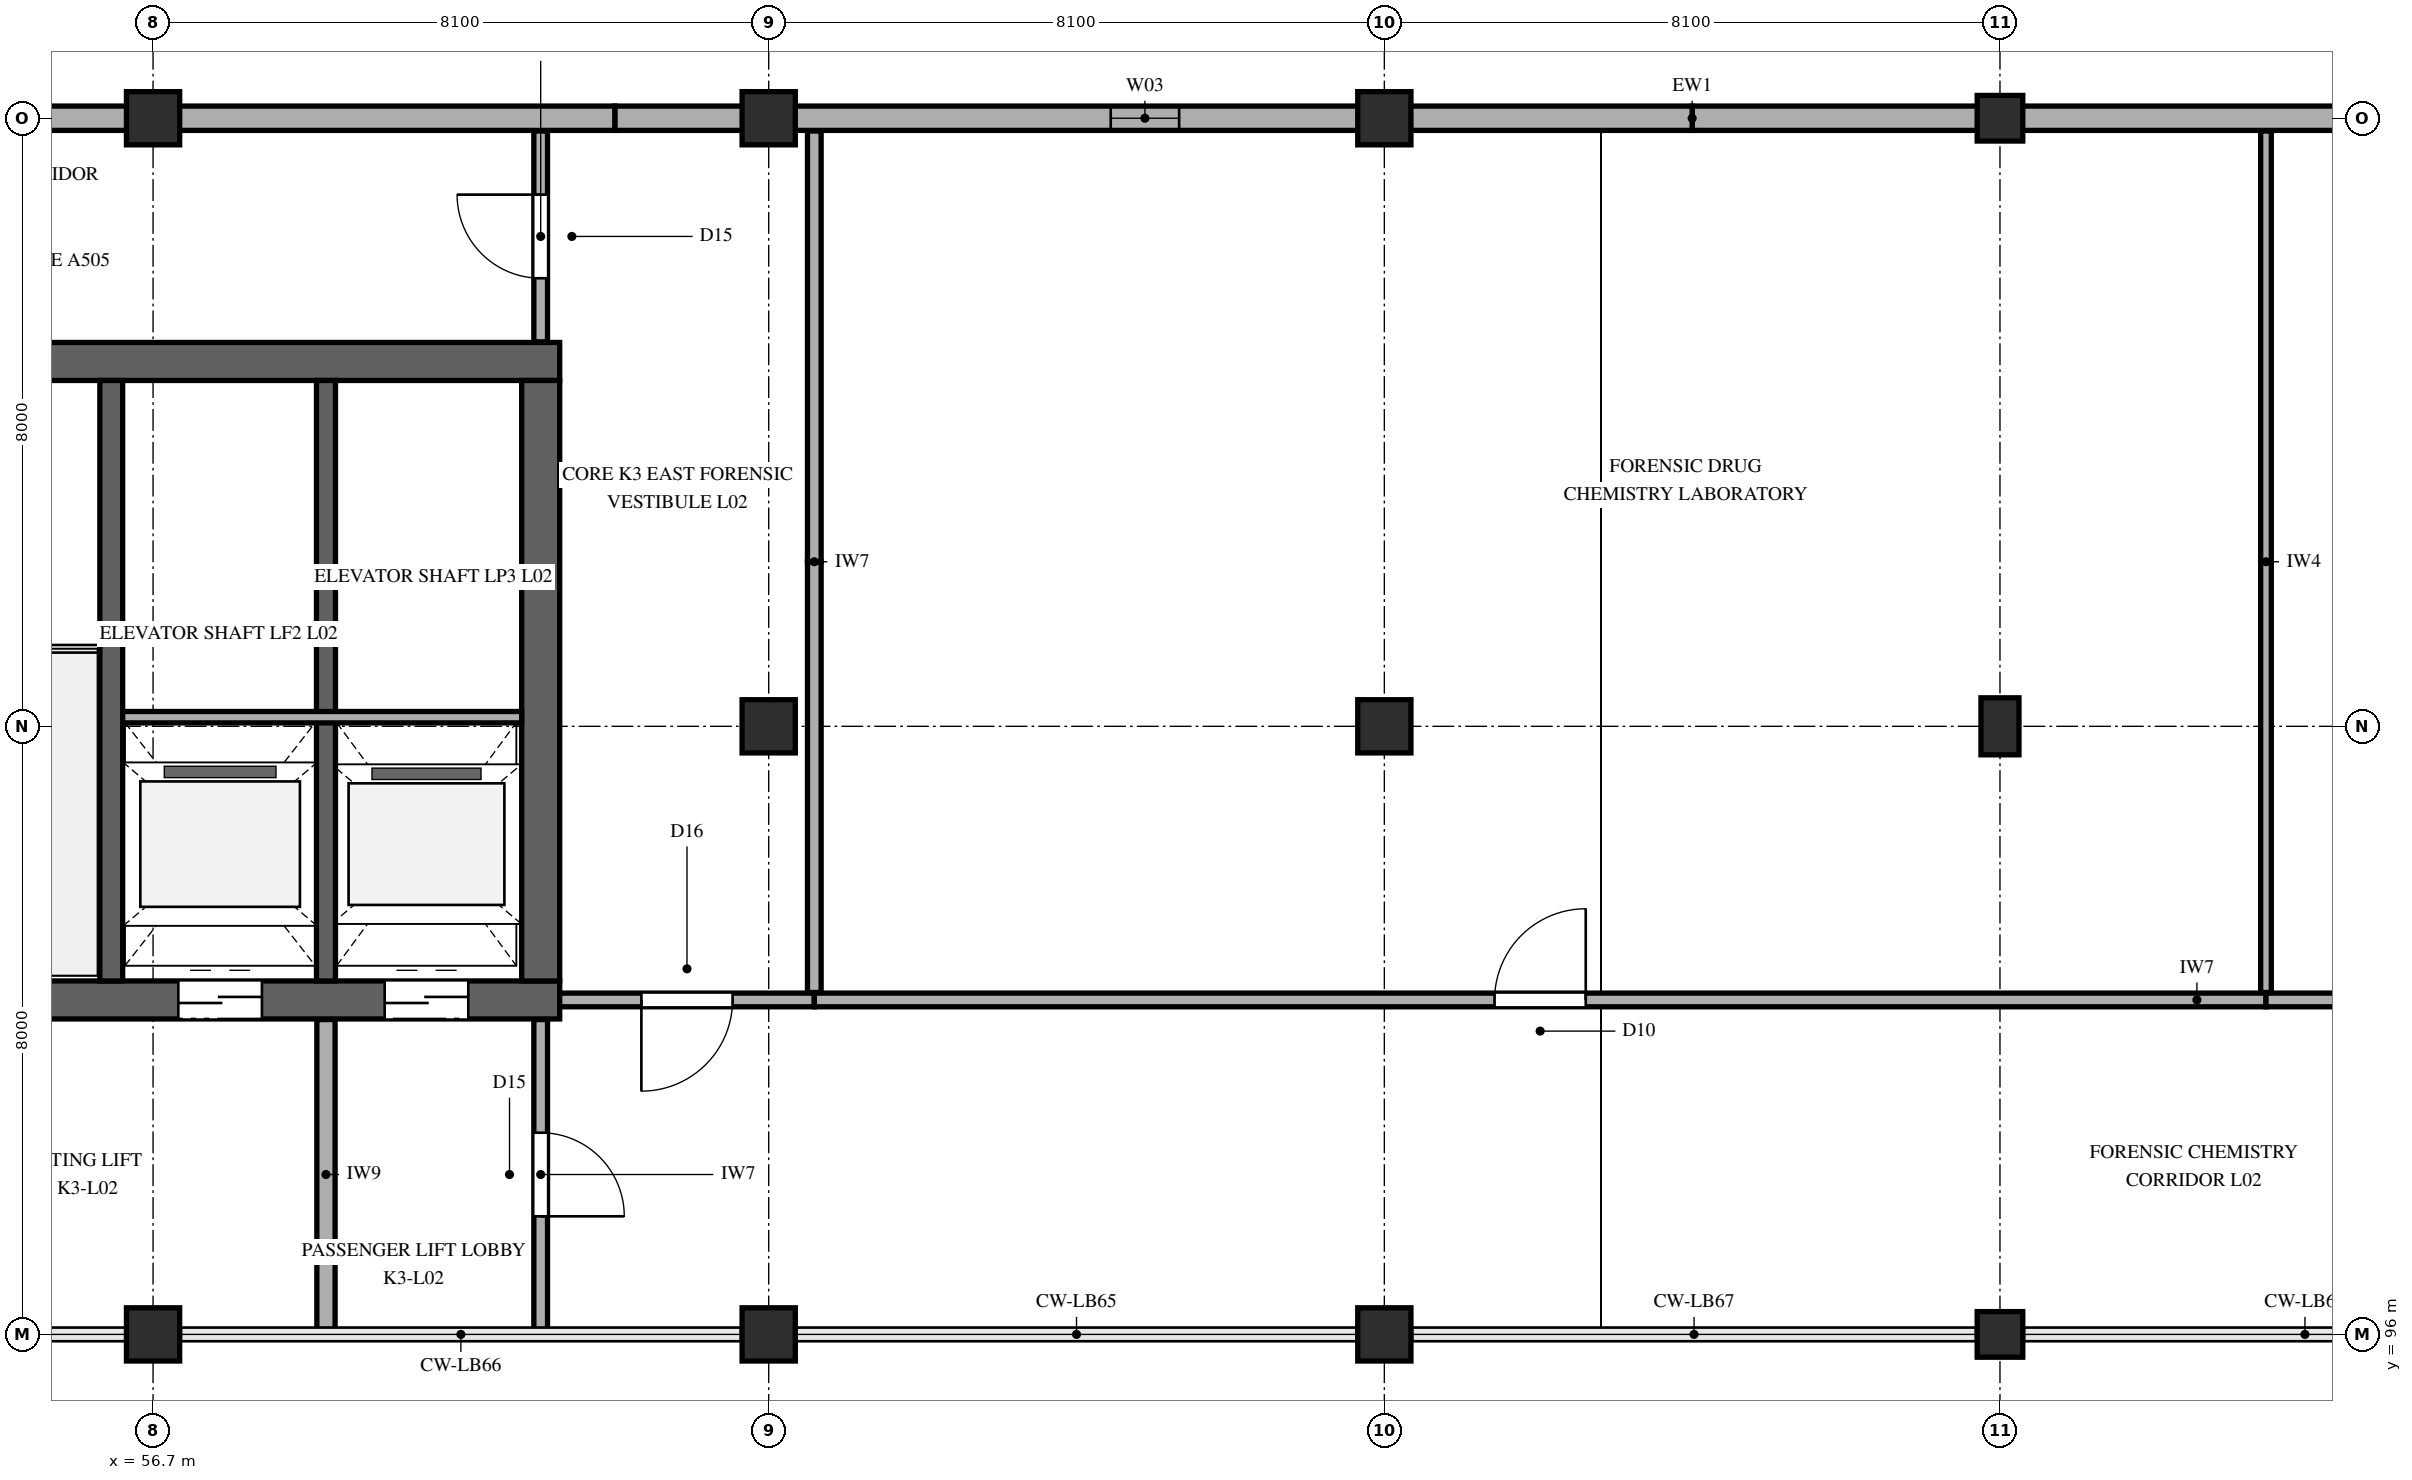
"""IFC4 building model, lengths in metres.
Left out: names, types, materials, properties, quantities, classifications, styles, units other than length and angle.
Written with IfcOpenShell. Run it as: python <this file> out.ifc"""

import sys

from ifc_helpers import new_model, si_unit, direction, frame, frame_2d, origin, origin_2d, place, context, subcontext, project, spatial, rectangle, extrude, element, fill, save


model = new_model("IFC4")
c1 = context("Model", 3, precision=1e-05, world=origin(), true_north=direction((0.0, 1.0)))
c2 = subcontext(c1, "Body", "Model", "MODEL_VIEW")
j1 = project(units=[si_unit("LENGTHUNIT", "METRE"), si_unit("PLANEANGLEUNIT", "RADIAN")], contexts=[c1])
p1 = place(None, origin())
s1 = spatial("IfcSite", under=j1, at=p1, CompositionType="ELEMENT")
p2 = place(p1, origin())
s2 = spatial("IfcBuilding", under=s1, at=p2, CompositionType="ELEMENT")
p3 = place(p2, frame((0.0, 0.0, 10.2)))
s3 = spatial("IfcBuildingStorey", under=s2, at=p3, CompositionType="ELEMENT", Elevation=10.2)
p4 = place(p3, frame((46.75, 100.4, 0.0), z_axis=(0.0, 0.0, 1.0), x_axis=(1.0, 0.0, 0.0)))
e1 = element("IfcWall", 1, at=p4, inside=s3, PredefinedType="SHEAR", context=c2, shape_type="SweptSolid", body=[
    extrude(rectangle(XDim=15.3, YDim=0.5, at=frame_2d((7.65, 0.0))), origin(), (0.0, 0.0, 1.0), 4.5),
])
p5 = place(p4, frame((1.0, 0.0, 0.0)))
e2 = element("IfcOpeningElement", 2, at=p5, cuts=e1, PredefinedType="OPENING", context=c2, shape_type="SweptSolid", body=[
    extrude(rectangle(XDim=1.15, YDim=2.25, at=frame_2d((0.575, 1.125))), frame((0.0, 0.26, 0.0), z_axis=(0.0, -1.0, 0.0), x_axis=(1.0, 0.0, 0.0)), (0.0, 0.0, 1.0), 0.52),
])
p6 = place(p4, frame((10.282, 0.0, 0.0)))
e3 = element("IfcOpeningElement", 3, at=p6, cuts=e1, PredefinedType="OPENING", context=c2, shape_type="SweptSolid", body=[
    extrude(rectangle(XDim=1.1, YDim=2.2, at=frame_2d((0.55, 1.1))), frame((0.0, 0.26, 0.0), z_axis=(0.0, -1.0, 0.0), x_axis=(1.0, 0.0, 0.0)), (0.0, 0.0, 1.0), 0.52),
])
p7 = place(p4, frame((12.998, 0.0, 0.0)))
e4 = element("IfcOpeningElement", 4, at=p7, cuts=e1, PredefinedType="OPENING", context=c2, shape_type="SweptSolid", body=[
    extrude(rectangle(XDim=1.1, YDim=2.2, at=frame_2d((0.55, 1.1))), frame((0.0, 0.26, 0.0), z_axis=(0.0, -1.0, 0.0), x_axis=(1.0, 0.0, 0.0)), (0.0, 0.0, 1.0), 0.52),
])
p8 = place(p3, frame((46.75, 108.8, 0.0), z_axis=(0.0, 0.0, 1.0), x_axis=(1.0, 0.0, 0.0)))
e5 = element("IfcWall", 5, at=p8, inside=s3, PredefinedType="SHEAR", context=c2, shape_type="SweptSolid", body=[
    extrude(rectangle(XDim=15.3, YDim=0.5, at=frame_2d((7.65, 0.0))), origin(), (0.0, 0.0, 1.0), 4.5),
])
p9 = place(p3, frame((61.8, 100.65, 0.0), z_axis=(0.0, 0.0, 1.0), x_axis=(0.0, 1.0, 0.0)))
e6 = element("IfcWall", 6, at=p9, inside=s3, PredefinedType="SHEAR", context=c2, shape_type="SweptSolid", body=[
    extrude(rectangle(XDim=7.9, YDim=0.5, at=frame_2d((3.95, 0.0))), origin(), (0.0, 0.0, 1.0), 4.5),
])
p10 = place(p3, frame((56.15, 100.65, 0.0), z_axis=(0.0, 0.0, 1.0), x_axis=(0.0, 1.0, 0.0)))
e7 = element("IfcWall", 7, at=p10, inside=s3, PredefinedType="SHEAR", context=c2, shape_type="SweptSolid", body=[
    extrude(rectangle(XDim=7.9, YDim=0.3, at=frame_2d((3.95, 0.0))), origin(), (0.0, 0.0, 1.0), 4.5),
])
p11 = place(p3, frame((58.975, 100.65, 0.0), z_axis=(0.0, 0.0, 1.0), x_axis=(0.0, 1.0, 0.0)))
e8 = element("IfcWall", 8, at=p11, inside=s3, PredefinedType="SHEAR", context=c2, shape_type="SweptSolid", body=[
    extrude(rectangle(XDim=7.9, YDim=0.25, at=frame_2d((3.95, 0.0))), origin(), (0.0, 0.0, 1.0), 4.5),
])
for number, where, z_axis, x_axis in (
    (9, (56.7, 96.0, 0.0), (0.0, 0.0, 1.0), (1.0, 0.0, 0.0)),
    (10, (56.7, 112.0, 0.0), (0.0, 0.0, 1.0), (1.0, 0.0, 0.0)),
    (11, (64.8, 96.0, 0.0), (0.0, 0.0, 1.0), (1.0, 0.0, 0.0)),
    (12, (64.8, 104.0, 0.0), (0.0, 0.0, 1.0), (1.0, 0.0, 0.0)),
    (13, (64.8, 112.0, 0.0), (0.0, 0.0, 1.0), (1.0, 0.0, 0.0)),
    (14, (72.9, 96.0, 0.0), (0.0, 0.0, 1.0), (1.0, 0.0, 0.0)),
    (15, (72.9, 104.0, 0.0), (0.0, 0.0, 1.0), (1.0, 0.0, 0.0)),
    (16, (72.9, 112.0, 0.0), (0.0, 0.0, 1.0), (1.0, 0.0, 0.0)),
):
    element("IfcColumn", number, at=place(p3, frame(where, z_axis=z_axis, x_axis=x_axis)), inside=s3, PredefinedType="COLUMN", context=c2, shape_type="SweptSolid", body=[
        extrude(rectangle(XDim=0.7, YDim=0.7, at=origin_2d()), origin(), (0.0, 0.0, 1.0), 4.5),
    ])
p12 = place(p3, frame((81.0, 96.0, 0.0), z_axis=(0.0, 0.0, 1.0), x_axis=(1.0, 0.0, 0.0)))
e17 = element("IfcColumn", 17, at=p12, inside=s3, PredefinedType="COLUMN", context=c2, shape_type="SweptSolid", body=[
    extrude(rectangle(XDim=0.6, YDim=0.6, at=origin_2d()), origin(), (0.0, 0.0, 1.0), 4.5),
])
p13 = place(p3, frame((81.0, 104.0, 0.0), z_axis=(0.0, 0.0, 1.0), x_axis=(1.0, 0.0, 0.0)))
e18 = element("IfcColumn", 18, at=p13, inside=s3, PredefinedType="COLUMN", context=c2, shape_type="SweptSolid", body=[
    extrude(rectangle(XDim=0.5, YDim=0.75, at=origin_2d()), origin(), (0.0, 0.0, 1.0), 4.5),
])
p14 = place(p3, frame((81.0, 112.0, 0.0), z_axis=(0.0, 0.0, 1.0), x_axis=(1.0, 0.0, 0.0)))
e19 = element("IfcColumn", 19, at=p14, inside=s3, PredefinedType="COLUMN", context=c2, shape_type="SweptSolid", body=[
    extrude(rectangle(XDim=0.6, YDim=0.6, at=origin_2d()), origin(), (0.0, 0.0, 1.0), 4.5),
])
p15 = place(p3, frame((91.125, 112.0, 0.0), z_axis=(0.0, 0.0, 1.0), x_axis=(-1.0, 0.0, 0.0)))
e20 = element("IfcWall", 20, at=p15, inside=s3, PredefinedType="SOLIDWALL", context=c2, shape_type="SweptSolid", body=[
    extrude(rectangle(XDim=14.175, YDim=0.32, at=frame_2d((7.087, 0.0))), origin(), (0.0, 0.0, 1.0), 3.632),
])
p16 = place(p15, frame((4.5, 0.0, 0.85)))
e21 = element("IfcOpeningElement", 21, at=p16, cuts=e20, PredefinedType="OPENING", context=c2, shape_type="SweptSolid", body=[
    extrude(rectangle(XDim=0.9, YDim=2.1, at=frame_2d((0.45, 1.05))), frame((0.0, 0.17, 0.0), z_axis=(0.0, -1.0, 0.0), x_axis=(1.0, 0.0, 0.0)), (0.0, 0.0, 1.0), 0.34),
])
p17 = place(p3, frame((76.95, 112.0, 0.0), z_axis=(0.0, 0.0, 1.0), x_axis=(-1.0, 0.0, 0.0)))
e22 = element("IfcWall", 22, at=p17, inside=s3, PredefinedType="SOLIDWALL", context=c2, shape_type="SweptSolid", body=[
    extrude(rectangle(XDim=14.175, YDim=0.32, at=frame_2d((7.087, 0.0))), origin(), (0.0, 0.0, 1.0), 3.632),
])
p18 = place(p17, frame((6.75, 0.0, 0.85)))
e23 = element("IfcOpeningElement", 23, at=p18, cuts=e22, PredefinedType="OPENING", context=c2, shape_type="SweptSolid", body=[
    extrude(rectangle(XDim=0.9, YDim=2.4, at=frame_2d((0.45, 1.2))), frame((0.0, 0.17, 0.0), z_axis=(0.0, -1.0, 0.0), x_axis=(1.0, 0.0, 0.0)), (0.0, 0.0, 1.0), 0.34),
])
p19 = place(p3, frame((62.775, 112.0, 0.0), z_axis=(0.0, 0.0, 1.0), x_axis=(-1.0, 0.0, 0.0)))
e24 = element("IfcWall", 24, at=p19, inside=s3, PredefinedType="SOLIDWALL", context=c2, shape_type="SweptSolid", body=[
    extrude(rectangle(XDim=14.175, YDim=0.32, at=frame_2d((7.087, 0.0))), origin(), (0.0, 0.0, 1.0), 3.632),
])
p20 = place(p19, frame((8.55, 0.0, 0.95)))
e25 = element("IfcOpeningElement", 25, at=p20, cuts=e24, PredefinedType="OPENING", context=c2, shape_type="SweptSolid", body=[
    extrude(rectangle(XDim=1.2, YDim=1.8, at=frame_2d((0.6, 0.9))), frame((0.0, 0.17, 0.0), z_axis=(0.0, -1.0, 0.0), x_axis=(1.0, 0.0, 0.0)), (0.0, 0.0, 1.0), 0.34),
])
p21 = place(p3, frame((56.3, 104.12, 0.0), z_axis=(0.0, 0.0, 1.0), x_axis=(1.0, 0.0, 0.0)))
e26 = element("IfcWall", 26, at=p21, inside=s3, PredefinedType="PARTITIONING", context=c2, shape_type="SweptSolid", body=[
    extrude(rectangle(XDim=5.25, YDim=0.15, at=frame_2d((2.625, 0.0))), origin(), (0.0, 0.0, 1.0), 4.24),
])
p22 = place(p3, frame((62.05, 100.4, 0.0), z_axis=(0.0, 0.0, 1.0), x_axis=(1.0, 0.0, 0.0)))
e27 = element("IfcWall", 27, at=p22, inside=s3, PredefinedType="PARTITIONING", context=c2, shape_type="SweptSolid", body=[
    extrude(rectangle(XDim=3.35, YDim=0.18, at=frame_2d((1.675, 0.0))), origin(), (0.0, 0.0, 1.0), 4.24),
])
p23 = place(p22, frame((1.075, 0.0, 0.0)))
e28 = element("IfcOpeningElement", 28, at=p23, cuts=e27, PredefinedType="OPENING", context=c2, shape_type="SweptSolid", body=[
    extrude(rectangle(XDim=1.2, YDim=2.2, at=frame_2d((0.6, 1.1))), frame((0.0, 0.1, 0.0), z_axis=(0.0, -1.0, 0.0), x_axis=(1.0, 0.0, 0.0)), (0.0, 0.0, 1.0), 0.2),
])
p24 = place(p3, frame((65.4, 100.4, 0.0), z_axis=(0.0, 0.0, 1.0), x_axis=(1.0, 0.0, 0.0)))
e29 = element("IfcWall", 29, at=p24, inside=s3, PredefinedType="PARTITIONING", context=c2, shape_type="SweptSolid", body=[
    extrude(rectangle(XDim=19.1, YDim=0.18, at=frame_2d((9.55, 0.0))), origin(), (0.0, 0.0, 1.0), 4.24),
])
p25 = place(p24, frame((8.95, 0.0, 0.0)))
e30 = element("IfcOpeningElement", 30, at=p25, cuts=e29, PredefinedType="OPENING", context=c2, shape_type="SweptSolid", body=[
    extrude(rectangle(XDim=1.2, YDim=2.3, at=frame_2d((0.6, 1.15))), frame((0.0, 0.1, 0.0), z_axis=(0.0, -1.0, 0.0), x_axis=(1.0, 0.0, 0.0)), (0.0, 0.0, 1.0), 0.2),
])
p26 = place(p3, frame((84.5, 100.4, 0.0), z_axis=(0.0, 0.0, 1.0), x_axis=(1.0, 0.0, 0.0)))
e31 = element("IfcWall", 31, at=p26, inside=s3, PredefinedType="PARTITIONING", context=c2, shape_type="SweptSolid", body=[
    extrude(rectangle(XDim=20.632, YDim=0.18, at=frame_2d((10.316, 0.0))), origin(), (0.0, 0.0, 1.0), 4.24),
])
p27 = place(p26, frame((9.716, 0.0, 0.0)))
e32 = element("IfcOpeningElement", 32, at=p27, cuts=e31, PredefinedType="OPENING", context=c2, shape_type="SweptSolid", body=[
    extrude(rectangle(XDim=1.2, YDim=2.3, at=frame_2d((0.6, 1.15))), frame((0.0, 0.1, 0.0), z_axis=(0.0, -1.0, 0.0), x_axis=(1.0, 0.0, 0.0)), (0.0, 0.0, 1.0), 0.2),
])
p28 = place(p3, frame((58.975, 96.065, 0.0), z_axis=(0.0, 0.0, 1.0), x_axis=(0.0, 1.0, 0.0)))
e33 = element("IfcWall", 33, at=p28, inside=s3, PredefinedType="PARTITIONING", context=c2, shape_type="SweptSolid", body=[
    extrude(rectangle(XDim=4.077, YDim=0.24, at=frame_2d((2.039, 0.0))), origin(), (0.0, 0.0, 1.0), 4.24),
])
p29 = place(p3, frame((61.8, 96.065, 0.0), z_axis=(0.0, 0.0, 1.0), x_axis=(0.0, 1.0, 0.0)))
e34 = element("IfcWall", 34, at=p29, inside=s3, PredefinedType="PARTITIONING", context=c2, shape_type="SweptSolid", body=[
    extrude(rectangle(XDim=4.077, YDim=0.18, at=frame_2d((2.039, 0.0))), origin(), (0.0, 0.0, 1.0), 4.24),
])
p30 = place(p29, frame((1.489, 0.0, 0.0)))
e35 = element("IfcOpeningElement", 35, at=p30, cuts=e34, PredefinedType="OPENING", context=c2, shape_type="SweptSolid", body=[
    extrude(rectangle(XDim=1.1, YDim=2.2, at=frame_2d((0.55, 1.1))), frame((0.0, 0.1, 0.0), z_axis=(0.0, -1.0, 0.0), x_axis=(1.0, 0.0, 0.0)), (0.0, 0.0, 1.0), 0.2),
])
p31 = place(p3, frame((61.8, 109.058, 0.0), z_axis=(0.0, 0.0, 1.0), x_axis=(0.0, 1.0, 0.0)))
e36 = element("IfcWall", 36, at=p31, inside=s3, PredefinedType="PARTITIONING", context=c2, shape_type="SweptSolid", body=[
    extrude(rectangle(XDim=2.774, YDim=0.18, at=frame_2d((1.387, 0.0))), origin(), (0.0, 0.0, 1.0), 4.24),
])
p32 = place(p31, frame((0.837, 0.0, 0.0)))
e37 = element("IfcOpeningElement", 37, at=p32, cuts=e36, PredefinedType="OPENING", context=c2, shape_type="SweptSolid", body=[
    extrude(rectangle(XDim=1.1, YDim=2.2, at=frame_2d((0.55, 1.1))), frame((0.0, 0.1, 0.0), z_axis=(0.0, -1.0, 0.0), x_axis=(1.0, 0.0, 0.0)), (0.0, 0.0, 1.0), 0.2),
])
for number, where, z_axis, x_axis in (
    (38, (65.4, 100.498, 0.0), (0.0, 0.0, 1.0), (0.0, 1.0, 0.0)),
    (39, (65.4, 106.165, 0.0), (0.0, 0.0, 1.0), (0.0, 1.0, 0.0)),
):
    element("IfcWall", number, at=place(p3, frame(where, z_axis=z_axis, x_axis=x_axis)), inside=s3, PredefinedType="PARTITIONING", context=c2, shape_type="SweptSolid", body=[
        extrude(rectangle(XDim=5.667, YDim=0.18, at=frame_2d((2.833, 0.0))), origin(), (0.0, 0.0, 1.0), 4.24),
    ])
for number, where, z_axis, x_axis in (
    (40, (84.5, 100.498, 0.0), (0.0, 0.0, 1.0), (0.0, 1.0, 0.0)),
    (41, (84.5, 106.165, 0.0), (0.0, 0.0, 1.0), (0.0, 1.0, 0.0)),
):
    element("IfcWall", number, at=place(p3, frame(where, z_axis=z_axis, x_axis=x_axis)), inside=s3, PredefinedType="PARTITIONING", context=c2, shape_type="SweptSolid", body=[
        extrude(rectangle(XDim=5.667, YDim=0.14, at=frame_2d((2.833, 0.0))), origin(), (0.0, 0.0, 1.0), 4.24),
    ])
p33 = place(p18, origin())
e42 = element("IfcWindow", 42, at=p33, inside=s3, PartitioningType="DOUBLE_PANEL_HORIZONTAL", PredefinedType="WINDOW", context=c2, shape_type="SweptSolid", body=[
    extrude(rectangle(XDim=0.9, YDim=2.4, at=frame_2d((0.45, 1.2))), frame((0.0, 0.03, 0.0), z_axis=(0.0, -1.0, 0.0), x_axis=(1.0, 0.0, 0.0)), (0.0, 0.0, 1.0), 0.06),
])
fill(e23, e42)
p34 = place(p6, frame((1.1, 0.0, 0.0), z_axis=(0.0, 0.0, 1.0), x_axis=(-1.0, 0.0, 0.0)))
e43 = element("IfcDoor", 43, at=p34, inside=s3, OperationType="DOUBLE_DOOR_SLIDING", PredefinedType="DOOR", context=c2, shape_type="SweptSolid", body=[
    extrude(rectangle(XDim=1.1, YDim=2.2, at=frame_2d((0.55, 1.1))), frame((0.0, 0.025, 0.0), z_axis=(0.0, -1.0, 0.0), x_axis=(1.0, 0.0, 0.0)), (0.0, 0.0, 1.0), 0.05),
])
fill(e3, e43)
p35 = place(p7, frame((1.1, 0.0, 0.0), z_axis=(0.0, 0.0, 1.0), x_axis=(-1.0, 0.0, 0.0)))
e44 = element("IfcDoor", 44, at=p35, inside=s3, OperationType="DOUBLE_DOOR_SLIDING", PredefinedType="DOOR", context=c2, shape_type="SweptSolid", body=[
    extrude(rectangle(XDim=1.1, YDim=2.2, at=frame_2d((0.55, 1.1))), frame((0.0, 0.025, 0.0), z_axis=(0.0, -1.0, 0.0), x_axis=(1.0, 0.0, 0.0)), (0.0, 0.0, 1.0), 0.05),
])
fill(e4, e44)
p36 = place(p23, frame((1.2, 0.0, 0.0), z_axis=(0.0, 0.0, 1.0), x_axis=(-1.0, 0.0, 0.0)))
e45 = element("IfcDoor", 45, at=p36, inside=s3, OperationType="SINGLE_SWING_LEFT", PredefinedType="DOOR", context=c2, shape_type="SweptSolid", body=[
    extrude(rectangle(XDim=1.2, YDim=2.2, at=frame_2d((0.6, 1.1))), frame((0.0, 0.025, 0.0), z_axis=(0.0, -1.0, 0.0), x_axis=(1.0, 0.0, 0.0)), (0.0, 0.0, 1.0), 0.05),
])
fill(e28, e45)
p37 = place(p25, origin())
e46 = element("IfcDoor", 46, at=p37, inside=s3, OperationType="SINGLE_SWING_RIGHT", PredefinedType="DOOR", context=c2, shape_type="SweptSolid", body=[
    extrude(rectangle(XDim=1.2, YDim=2.3, at=frame_2d((0.6, 1.15))), frame((0.0, 0.025, 0.0), z_axis=(0.0, -1.0, 0.0), x_axis=(1.0, 0.0, 0.0)), (0.0, 0.0, 1.0), 0.05),
])
fill(e30, e46)
p38 = place(p30, frame((1.1, 0.0, 0.0), z_axis=(0.0, 0.0, 1.0), x_axis=(-1.0, 0.0, 0.0)))
e47 = element("IfcDoor", 47, at=p38, inside=s3, OperationType="SINGLE_SWING_LEFT", PredefinedType="DOOR", context=c2, shape_type="SweptSolid", body=[
    extrude(rectangle(XDim=1.1, YDim=2.2, at=frame_2d((0.55, 1.1))), frame((0.0, 0.025, 0.0), z_axis=(0.0, -1.0, 0.0), x_axis=(1.0, 0.0, 0.0)), (0.0, 0.0, 1.0), 0.05),
])
fill(e35, e47)
p39 = place(p32, origin())
e48 = element("IfcDoor", 48, at=p39, inside=s3, OperationType="SINGLE_SWING_RIGHT", PredefinedType="DOOR", context=c2, shape_type="SweptSolid", body=[
    extrude(rectangle(XDim=1.1, YDim=2.2, at=frame_2d((0.55, 1.1))), frame((0.0, 0.025, 0.0), z_axis=(0.0, -1.0, 0.0), x_axis=(1.0, 0.0, 0.0)), (0.0, 0.0, 1.0), 0.05),
])
fill(e37, e48)
save(model, sys.argv[1])
